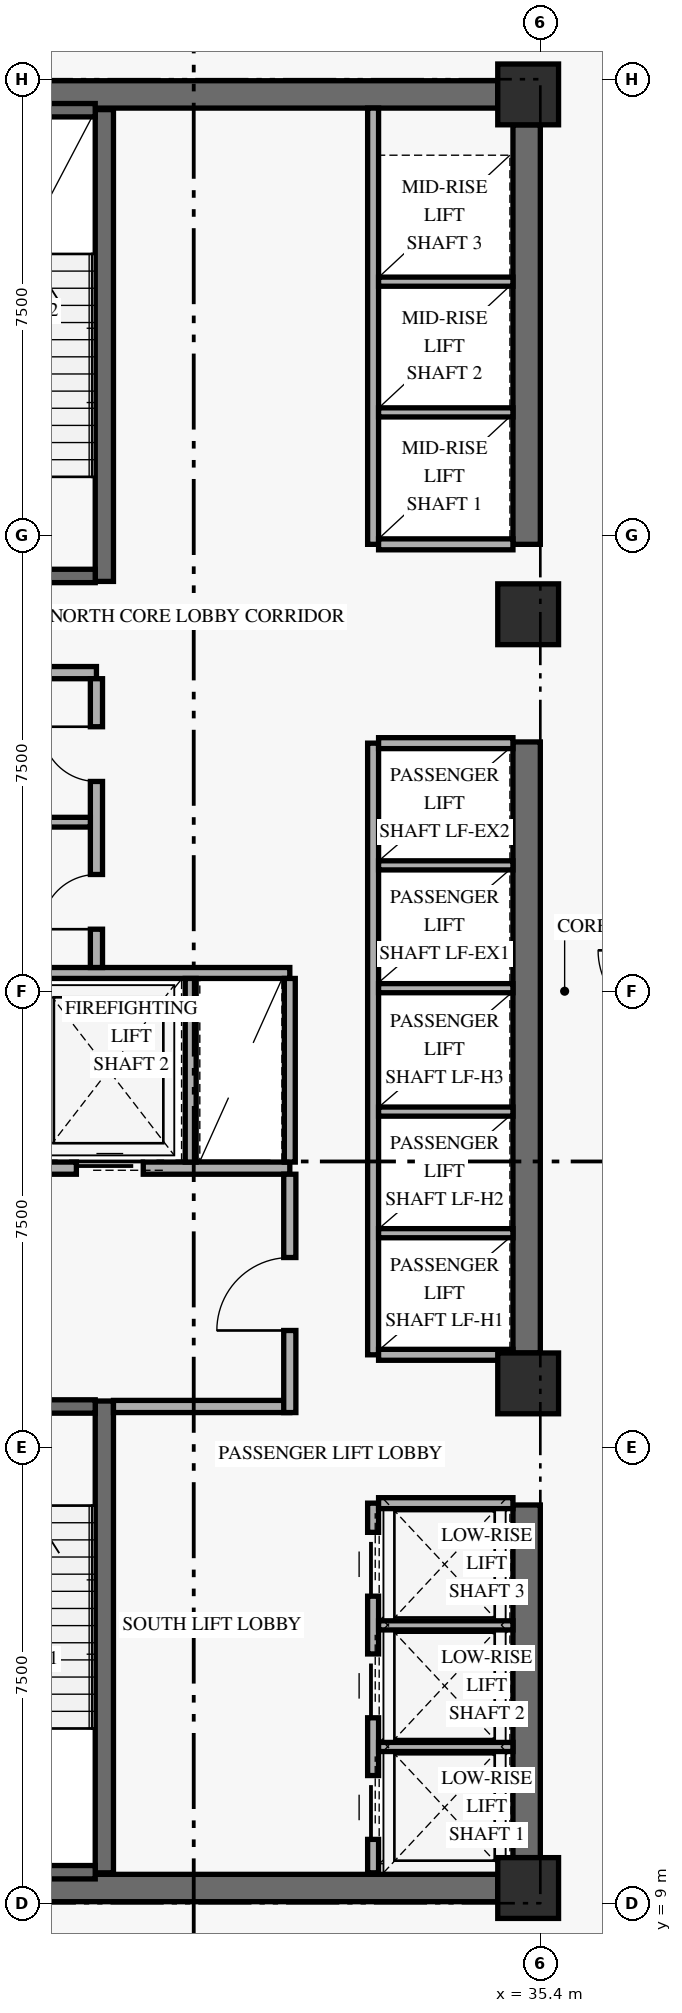
"""IFC4 building model, lengths in metres.
Left out: names, types, materials, properties, quantities, classifications, styles, units other than length and angle.
Written with IfcOpenShell. Run it as: python <this file> out.ifc"""

import sys

from ifc_helpers import new_model, si_unit, direction, frame, frame_2d, origin, origin_2d, place, context, subcontext, project, spatial, rectangle, extrude, element, fill, save


model = new_model("IFC4")
c1 = context("Model", 3, precision=1e-05, world=origin(), true_north=direction((0.0, 1.0)))
c2 = subcontext(c1, "Body", "Model", "MODEL_VIEW")
j1 = project(units=[si_unit("LENGTHUNIT", "METRE"), si_unit("PLANEANGLEUNIT", "RADIAN")], contexts=[c1])
p1 = place(None, origin())
s1 = spatial("IfcSite", under=j1, at=p1, CompositionType="ELEMENT")
p2 = place(p1, origin())
s2 = spatial("IfcBuilding", under=s1, at=p2, CompositionType="ELEMENT")
p3 = place(p2, frame((0.0, 0.0, 9.6)))
s3 = spatial("IfcBuildingStorey", under=s2, at=p3, CompositionType="ELEMENT", Elevation=9.6)
p4 = place(p3, frame((35.175, 9.75, 0.0), z_axis=(0.0, 0.0, 1.0), x_axis=(0.0, 1.0, 0.0)))
e1 = element("IfcWall", 1, at=p4, inside=s3, PredefinedType="SHEAR", context=c2, shape_type="SweptSolid", body=[
    extrude(rectangle(XDim=5.8, YDim=0.45, at=frame_2d((2.9, 0.0))), origin(), (0.0, 0.0, 1.0), 3.75),
])
p5 = place(p3, frame((35.175, 18.05, 0.0), z_axis=(0.0, 0.0, 1.0), x_axis=(0.0, 1.0, 0.0)))
e2 = element("IfcWall", 2, at=p5, inside=s3, PredefinedType="SHEAR", context=c2, shape_type="SweptSolid", body=[
    extrude(rectangle(XDim=10.05, YDim=0.45, at=frame_2d((5.025, 0.0))), origin(), (0.0, 0.0, 1.0), 3.75),
])
p6 = place(p3, frame((35.175, 31.35, 0.0), z_axis=(0.0, 0.0, 1.0), x_axis=(0.0, 1.0, 0.0)))
e3 = element("IfcWall", 3, at=p6, inside=s3, PredefinedType="SHEAR", context=c2, shape_type="SweptSolid", body=[
    extrude(rectangle(XDim=6.9, YDim=0.45, at=frame_2d((3.45, 0.0))), origin(), (0.0, 0.0, 1.0), 3.75),
])
for number, where, z_axis, x_axis in (
    (4, (24.7, 9.25, 0.0), (0.0, 0.0, 1.0), (1.0, 0.0, 0.0)),
    (5, (24.7, 38.75, 0.0), (0.0, 0.0, 1.0), (1.0, 0.0, 0.0)),
):
    element("IfcWall", number, at=place(p3, frame(where, z_axis=z_axis, x_axis=x_axis)), inside=s3, PredefinedType="SHEAR", context=c2, shape_type="SweptSolid", body=[
        extrude(rectangle(XDim=10.0, YDim=0.45, at=frame_2d((5.0, 0.0))), origin(), (0.0, 0.0, 1.0), 4.52),
    ])
p7 = place(p3, frame((28.23, 9.5, 0.0), z_axis=(0.0, 0.0, 1.0), x_axis=(0.0, 1.0, 0.0)))
e6 = element("IfcWall", 6, at=p7, inside=s3, PredefinedType="SHEAR", context=c2, shape_type="SweptSolid", body=[
    extrude(rectangle(XDim=7.76, YDim=0.3, at=frame_2d((3.88, 0.0))), origin(), (0.0, 0.0, 1.0), 4.52),
])
p8 = place(p3, frame((24.92, 9.51, 0.0), z_axis=(0.0, 0.0, 1.0), x_axis=(1.0, 0.0, 0.0)))
e7 = element("IfcWall", 7, at=p8, inside=s3, PredefinedType="SHEAR", context=c2, shape_type="SweptSolid", body=[
    extrude(rectangle(XDim=3.16, YDim=0.22, at=frame_2d((1.58, 0.0))), origin(), (0.0, 0.0, 1.0), 4.52),
])
p9 = place(p3, frame((24.92, 17.17, 0.0), z_axis=(0.0, 0.0, 1.0), x_axis=(1.0, 0.0, 0.0)))
e8 = element("IfcWall", 8, at=p9, inside=s3, PredefinedType="SHEAR", context=c2, shape_type="SweptSolid", body=[
    extrude(rectangle(XDim=3.16, YDim=0.22, at=frame_2d((1.58, 0.0))), origin(), (0.0, 0.0, 1.0), 4.52),
])
p10 = place(p9, frame((0.78, 0.0, 0.0)))
e9 = element("IfcOpeningElement", 9, at=p10, cuts=e8, PredefinedType="OPENING", context=c2, shape_type="SweptSolid", body=[
    extrude(rectangle(XDim=1.05, YDim=2.15, at=frame_2d((0.525, 1.075))), frame((0.0, 0.12, 0.0), z_axis=(0.0, -1.0, 0.0), x_axis=(1.0, 0.0, 0.0)), (0.0, 0.0, 1.0), 0.24),
])
p11 = place(p3, frame((28.23, 30.74, 0.0), z_axis=(0.0, 0.0, 1.0), x_axis=(0.0, 1.0, 0.0)))
e10 = element("IfcWall", 10, at=p11, inside=s3, PredefinedType="SHEAR", context=c2, shape_type="SweptSolid", body=[
    extrude(rectangle(XDim=7.76, YDim=0.3, at=frame_2d((3.88, 0.0))), origin(), (0.0, 0.0, 1.0), 4.52),
])
p12 = place(p3, frame((24.92, 30.83, 0.0), z_axis=(0.0, 0.0, 1.0), x_axis=(1.0, 0.0, 0.0)))
e11 = element("IfcWall", 11, at=p12, inside=s3, PredefinedType="SHEAR", context=c2, shape_type="SweptSolid", body=[
    extrude(rectangle(XDim=3.16, YDim=0.22, at=frame_2d((1.58, 0.0))), origin(), (0.0, 0.0, 1.0), 4.52),
])
p13 = place(p12, frame((0.78, 0.0, 0.0)))
e12 = element("IfcOpeningElement", 12, at=p13, cuts=e11, PredefinedType="OPENING", context=c2, shape_type="SweptSolid", body=[
    extrude(rectangle(XDim=1.05, YDim=2.15, at=frame_2d((0.525, 1.075))), frame((0.0, 0.12, 0.0), z_axis=(0.0, -1.0, 0.0), x_axis=(1.0, 0.0, 0.0)), (0.0, 0.0, 1.0), 0.24),
])
p14 = place(p3, frame((24.92, 38.49, 0.0), z_axis=(0.0, 0.0, 1.0), x_axis=(1.0, 0.0, 0.0)))
e13 = element("IfcWall", 13, at=p14, inside=s3, PredefinedType="SHEAR", context=c2, shape_type="SweptSolid", body=[
    extrude(rectangle(XDim=3.16, YDim=0.22, at=frame_2d((1.58, 0.0))), origin(), (0.0, 0.0, 1.0), 4.52),
])
for number, where, z_axis, x_axis in (
    (14, (35.2, 9.25, 0.0), (0.0, 0.0, 1.0), (1.0, 0.0, 0.0)),
    (15, (35.2, 17.55, 0.0), (0.0, 0.0, 1.0), (1.0, 0.0, 0.0)),
    (16, (35.2, 30.2, 0.0), (0.0, 0.0, 1.0), (1.0, 0.0, 0.0)),
    (17, (35.2, 38.75, 0.0), (0.0, 0.0, 1.0), (1.0, 0.0, 0.0)),
):
    element("IfcColumn", number, at=place(p3, frame(where, z_axis=z_axis, x_axis=x_axis)), inside=s3, PredefinedType="COLUMN", context=c2, shape_type="SweptSolid", body=[
        extrude(rectangle(XDim=1.0, YDim=1.0, at=origin_2d()), origin(), (0.0, 0.0, 1.0), 4.8),
    ])
p15 = place(p3, frame((24.45, 21.09, 0.0), z_axis=(0.0, 0.0, 1.0), x_axis=(1.0, 0.0, 0.0)))
e18 = element("IfcWall", 18, at=p15, inside=s3, PredefinedType="STANDARD", context=c2, shape_type="SweptSolid", body=[
    extrude(rectangle(XDim=6.83, YDim=0.2, at=frame_2d((3.415, 0.0))), origin(), (0.0, 0.0, 1.0), 4.52),
])
p16 = place(p15, frame((0.72, 0.0, 0.0)))
e19 = element("IfcOpeningElement", 19, at=p16, cuts=e18, PredefinedType="OPENING", context=c2, shape_type="SweptSolid", body=[
    extrude(rectangle(XDim=1.1, YDim=2.2, at=frame_2d((0.55, 1.1))), frame((0.0, 0.11, 0.0), z_axis=(0.0, -1.0, 0.0), x_axis=(1.0, 0.0, 0.0)), (0.0, 0.0, 1.0), 0.22),
])
p17 = place(p15, frame((3.32, 0.0, 0.0)))
e20 = element("IfcOpeningElement", 20, at=p17, cuts=e18, PredefinedType="OPENING", context=c2, shape_type="SweptSolid", body=[
    extrude(rectangle(XDim=1.1, YDim=2.2, at=frame_2d((0.55, 1.1))), frame((0.0, 0.11, 0.0), z_axis=(0.0, -1.0, 0.0), x_axis=(1.0, 0.0, 0.0)), (0.0, 0.0, 1.0), 0.22),
])
p18 = place(p3, frame((28.38, 17.17, 0.0), z_axis=(0.0, 0.0, 1.0), x_axis=(1.0, 0.0, 0.0)))
e21 = element("IfcWall", 21, at=p18, inside=s3, PredefinedType="STANDARD", context=c2, shape_type="SweptSolid", body=[
    extrude(rectangle(XDim=2.9, YDim=0.2, at=frame_2d((1.45, 0.0))), origin(), (0.0, 0.0, 1.0), 4.52),
])
p19 = place(p3, frame((31.28, 17.07, 0.0), z_axis=(0.0, 0.0, 1.0), x_axis=(0.0, 1.0, 0.0)))
e22 = element("IfcWall", 22, at=p19, inside=s3, PredefinedType="STANDARD", context=c2, shape_type="SweptSolid", body=[
    extrude(rectangle(XDim=3.92, YDim=0.2, at=frame_2d((1.96, 0.0))), origin(), (0.0, 0.0, 1.0), 3.575),
])
p20 = place(p19, frame((1.35, 0.0, 0.0)))
e23 = element("IfcOpeningElement", 23, at=p20, cuts=e22, PredefinedType="OPENING", context=c2, shape_type="SweptSolid", body=[
    extrude(rectangle(XDim=1.2, YDim=2.15, at=frame_2d((0.6, 1.075))), frame((0.0, 0.11, 0.0), z_axis=(0.0, -1.0, 0.0), x_axis=(1.0, 0.0, 0.0)), (0.0, 0.0, 1.0), 0.22),
])
p21 = place(p3, frame((24.45, 24.3, 0.0), z_axis=(0.0, 0.0, 1.0), x_axis=(1.0, 0.0, 0.0)))
e24 = element("IfcWall", 24, at=p21, inside=s3, PredefinedType="STANDARD", context=c2, shape_type="SweptSolid", body=[
    extrude(rectangle(XDim=6.83, YDim=0.18, at=frame_2d((3.415, 0.0))), origin(), (0.0, 0.0, 1.0), 4.52),
])
for number, where, z_axis, x_axis in (
    (25, (29.65, 21.19, 0.0), (0.0, 0.0, 1.0), (0.0, 1.0, 0.0)),
    (26, (31.28, 21.19, 0.0), (0.0, 0.0, 1.0), (0.0, 1.0, 0.0)),
):
    element("IfcWall", number, at=place(p3, frame(where, z_axis=z_axis, x_axis=x_axis)), inside=s3, PredefinedType="STANDARD", context=c2, shape_type="SweptSolid", body=[
        extrude(rectangle(XDim=3.02, YDim=0.18, at=frame_2d((1.51, 0.0))), origin(), (0.0, 0.0, 1.0), 4.52),
    ])
p22 = place(p3, frame((24.45, 29.24, 0.0), z_axis=(0.0, 0.0, 1.0), x_axis=(1.0, 0.0, 0.0)))
e27 = element("IfcWall", 27, at=p22, inside=s3, PredefinedType="STANDARD", context=c2, shape_type="SweptSolid", body=[
    extrude(rectangle(XDim=3.65, YDim=0.2, at=frame_2d((1.825, 0.0))), origin(), (0.0, 0.0, 1.0), 4.52),
])
p23 = place(p3, frame((28.1, 24.39, 0.0), z_axis=(0.0, 0.0, 1.0), x_axis=(0.0, 1.0, 0.0)))
e28 = element("IfcWall", 28, at=p23, inside=s3, PredefinedType="STANDARD", context=c2, shape_type="SweptSolid", body=[
    extrude(rectangle(XDim=4.75, YDim=0.2, at=frame_2d((2.375, 0.0))), origin(), (0.0, 0.0, 1.0), 4.52),
])
p24 = place(p23, frame((0.63, 0.0, 0.0)))
e29 = element("IfcOpeningElement", 29, at=p24, cuts=e28, PredefinedType="OPENING", context=c2, shape_type="SweptSolid", body=[
    extrude(rectangle(XDim=0.9, YDim=2.1, at=frame_2d((0.45, 1.05))), frame((0.0, 0.11, 0.0), z_axis=(0.0, -1.0, 0.0), x_axis=(1.0, 0.0, 0.0)), (0.0, 0.0, 1.0), 0.22),
])
p25 = place(p23, frame((3.06, 0.0, 0.0)))
e30 = element("IfcOpeningElement", 30, at=p25, cuts=e28, PredefinedType="OPENING", context=c2, shape_type="SweptSolid", body=[
    extrude(rectangle(XDim=0.9, YDim=2.1, at=frame_2d((0.45, 1.05))), frame((0.0, 0.11, 0.0), z_axis=(0.0, -1.0, 0.0), x_axis=(1.0, 0.0, 0.0)), (0.0, 0.0, 1.0), 0.22),
])
p26 = place(p3, frame((24.45, 26.78, 0.0), z_axis=(0.0, 0.0, 1.0), x_axis=(1.0, 0.0, 0.0)))
e31 = element("IfcWall", 31, at=p26, inside=s3, PredefinedType="PARTITIONING", context=c2, shape_type="SweptSolid", body=[
    extrude(rectangle(XDim=3.55, YDim=0.16, at=frame_2d((1.775, 0.0))), origin(), (0.0, 0.0, 1.0), 4.52),
])
p27 = place(p3, frame((32.65, 9.5, 0.0), z_axis=(0.0, 0.0, 1.0), x_axis=(0.0, 1.0, 0.0)))
e32 = element("IfcWall", 32, at=p27, inside=s3, PredefinedType="STANDARD", context=c2, shape_type="SweptSolid", body=[
    extrude(rectangle(XDim=6.08, YDim=0.18, at=frame_2d((3.04, 0.0))), origin(), (0.0, 0.0, 1.0), 4.52),
])
p28 = place(p27, frame((0.55, 0.0, 0.0)))
e33 = element("IfcOpeningElement", 33, at=p28, cuts=e32, PredefinedType="OPENING", context=c2, shape_type="SweptSolid", body=[
    extrude(rectangle(XDim=1.05, YDim=2.2, at=frame_2d((0.525, 1.1))), frame((0.0, 0.1, 0.0), z_axis=(0.0, -1.0, 0.0), x_axis=(1.0, 0.0, 0.0)), (0.0, 0.0, 1.0), 0.2),
])
p29 = place(p27, frame((2.55, 0.0, 0.0)))
e34 = element("IfcOpeningElement", 34, at=p29, cuts=e32, PredefinedType="OPENING", context=c2, shape_type="SweptSolid", body=[
    extrude(rectangle(XDim=1.05, YDim=2.2, at=frame_2d((0.525, 1.1))), frame((0.0, 0.1, 0.0), z_axis=(0.0, -1.0, 0.0), x_axis=(1.0, 0.0, 0.0)), (0.0, 0.0, 1.0), 0.2),
])
p30 = place(p27, frame((4.55, 0.0, 0.0)))
e35 = element("IfcOpeningElement", 35, at=p30, cuts=e32, PredefinedType="OPENING", context=c2, shape_type="SweptSolid", body=[
    extrude(rectangle(XDim=1.05, YDim=2.2, at=frame_2d((0.525, 1.1))), frame((0.0, 0.1, 0.0), z_axis=(0.0, -1.0, 0.0), x_axis=(1.0, 0.0, 0.0)), (0.0, 0.0, 1.0), 0.2),
])
p31 = place(p3, frame((32.74, 15.58, 0.0), z_axis=(0.0, 0.0, 1.0), x_axis=(1.0, 0.0, 0.0)))
e36 = element("IfcWall", 36, at=p31, inside=s3, PredefinedType="STANDARD", context=c2, shape_type="SweptSolid", body=[
    extrude(rectangle(XDim=2.21, YDim=0.18, at=frame_2d((1.105, 0.0))), origin(), (0.0, 0.0, 1.0), 4.52),
])
for number, where, z_axis, x_axis in (
    (37, (32.74, 11.57, 0.0), (0.0, 0.0, 1.0), (1.0, 0.0, 0.0)),
    (38, (32.74, 13.57, 0.0), (0.0, 0.0, 1.0), (1.0, 0.0, 0.0)),
):
    element("IfcWall", number, at=place(p3, frame(where, z_axis=z_axis, x_axis=x_axis)), inside=s3, PredefinedType="STANDARD", context=c2, shape_type="SweptSolid", body=[
        extrude(rectangle(XDim=2.21, YDim=0.15, at=frame_2d((1.105, 0.0))), origin(), (0.0, 0.0, 1.0), 4.52),
    ])
p32 = place(p3, frame((32.65, 18.02, 0.0), z_axis=(0.0, 0.0, 1.0), x_axis=(0.0, 1.0, 0.0)))
e39 = element("IfcWall", 39, at=p32, inside=s3, PredefinedType="STANDARD", context=c2, shape_type="SweptSolid", body=[
    extrude(rectangle(XDim=10.06, YDim=0.18, at=frame_2d((5.03, 0.0))), origin(), (0.0, 0.0, 1.0), 4.52),
])
for number, where, z_axis, x_axis in (
    (40, (32.74, 18.02, 0.0), (0.0, 0.0, 1.0), (1.0, 0.0, 0.0)),
    (41, (32.74, 28.08, 0.0), (0.0, 0.0, 1.0), (1.0, 0.0, 0.0)),
):
    element("IfcWall", number, at=place(p3, frame(where, z_axis=z_axis, x_axis=x_axis)), inside=s3, PredefinedType="STANDARD", context=c2, shape_type="SweptSolid", body=[
        extrude(rectangle(XDim=2.21, YDim=0.18, at=frame_2d((1.105, 0.0))), origin(), (0.0, 0.0, 1.0), 4.52),
    ])
for number, where, z_axis, x_axis in (
    (42, (32.74, 20.02, 0.0), (0.0, 0.0, 1.0), (1.0, 0.0, 0.0)),
    (43, (32.74, 22.02, 0.0), (0.0, 0.0, 1.0), (1.0, 0.0, 0.0)),
    (44, (32.74, 24.05, 0.0), (0.0, 0.0, 1.0), (1.0, 0.0, 0.0)),
    (45, (32.74, 26.07, 0.0), (0.0, 0.0, 1.0), (1.0, 0.0, 0.0)),
):
    element("IfcWall", number, at=place(p3, frame(where, z_axis=z_axis, x_axis=x_axis)), inside=s3, PredefinedType="STANDARD", context=c2, shape_type="SweptSolid", body=[
        extrude(rectangle(XDim=2.21, YDim=0.15, at=frame_2d((1.105, 0.0))), origin(), (0.0, 0.0, 1.0), 4.52),
    ])
p33 = place(p3, frame((32.65, 31.35, 0.0), z_axis=(0.0, 0.0, 1.0), x_axis=(0.0, 1.0, 0.0)))
e46 = element("IfcWall", 46, at=p33, inside=s3, PredefinedType="STANDARD", context=c2, shape_type="SweptSolid", body=[
    extrude(rectangle(XDim=7.175, YDim=0.18, at=frame_2d((3.587, 0.0))), origin(), (0.0, 0.0, 1.0), 4.52),
])
p34 = place(p3, frame((32.74, 31.35, 0.0), z_axis=(0.0, 0.0, 1.0), x_axis=(1.0, 0.0, 0.0)))
e47 = element("IfcWall", 47, at=p34, inside=s3, PredefinedType="STANDARD", context=c2, shape_type="SweptSolid", body=[
    extrude(rectangle(XDim=2.21, YDim=0.18, at=frame_2d((1.105, 0.0))), origin(), (0.0, 0.0, 1.0), 4.52),
])
for number, where, z_axis, x_axis in (
    (48, (32.74, 33.52, 0.0), (0.0, 0.0, 1.0), (1.0, 0.0, 0.0)),
    (49, (32.74, 35.67, 0.0), (0.0, 0.0, 1.0), (1.0, 0.0, 0.0)),
):
    element("IfcWall", number, at=place(p3, frame(where, z_axis=z_axis, x_axis=x_axis)), inside=s3, PredefinedType="STANDARD", context=c2, shape_type="SweptSolid", body=[
        extrude(rectangle(XDim=2.21, YDim=0.15, at=frame_2d((1.105, 0.0))), origin(), (0.0, 0.0, 1.0), 4.52),
    ])
p35 = place(p17, origin())
e50 = element("IfcDoor", 50, at=p35, inside=s3, OperationType="SLIDING_TO_LEFT", PredefinedType="DOOR", context=c2, shape_type="SweptSolid", body=[
    extrude(rectangle(XDim=1.1, YDim=2.2, at=frame_2d((0.55, 1.1))), frame((0.0, 0.025, 0.0), z_axis=(0.0, -1.0, 0.0), x_axis=(1.0, 0.0, 0.0)), (0.0, 0.0, 1.0), 0.05),
])
fill(e20, e50)
p36 = place(p20, origin())
e51 = element("IfcDoor", 51, at=p36, inside=s3, OperationType="SINGLE_SWING_LEFT", PredefinedType="DOOR", context=c2, shape_type="SweptSolid", body=[
    extrude(rectangle(XDim=1.2, YDim=2.15, at=frame_2d((0.6, 1.075))), frame((0.0, 0.025, 0.0), z_axis=(0.0, -1.0, 0.0), x_axis=(1.0, 0.0, 0.0)), (0.0, 0.0, 1.0), 0.05),
])
fill(e23, e51)
p37 = place(p24, origin())
e52 = element("IfcDoor", 52, at=p37, inside=s3, OperationType="SINGLE_SWING_LEFT", PredefinedType="DOOR", context=c2, shape_type="SweptSolid", body=[
    extrude(rectangle(XDim=0.9, YDim=2.1, at=frame_2d((0.45, 1.05))), frame((0.0, 0.025, 0.0), z_axis=(0.0, -1.0, 0.0), x_axis=(1.0, 0.0, 0.0)), (0.0, 0.0, 1.0), 0.05),
])
fill(e29, e52)
p38 = place(p25, origin())
e53 = element("IfcDoor", 53, at=p38, inside=s3, OperationType="SINGLE_SWING_RIGHT", PredefinedType="DOOR", context=c2, shape_type="SweptSolid", body=[
    extrude(rectangle(XDim=0.9, YDim=2.1, at=frame_2d((0.45, 1.05))), frame((0.0, 0.025, 0.0), z_axis=(0.0, -1.0, 0.0), x_axis=(1.0, 0.0, 0.0)), (0.0, 0.0, 1.0), 0.05),
])
fill(e30, e53)
p39 = place(p28, origin())
e54 = element("IfcDoor", 54, at=p39, inside=s3, OperationType="SLIDING_TO_LEFT", PredefinedType="DOOR", context=c2, shape_type="SweptSolid", body=[
    extrude(rectangle(XDim=1.05, YDim=2.2, at=frame_2d((0.525, 1.1))), frame((0.0, 0.025, 0.0), z_axis=(0.0, -1.0, 0.0), x_axis=(1.0, 0.0, 0.0)), (0.0, 0.0, 1.0), 0.05),
])
fill(e33, e54)
p40 = place(p29, origin())
e55 = element("IfcDoor", 55, at=p40, inside=s3, OperationType="SLIDING_TO_LEFT", PredefinedType="DOOR", context=c2, shape_type="SweptSolid", body=[
    extrude(rectangle(XDim=1.05, YDim=2.2, at=frame_2d((0.525, 1.1))), frame((0.0, 0.025, 0.0), z_axis=(0.0, -1.0, 0.0), x_axis=(1.0, 0.0, 0.0)), (0.0, 0.0, 1.0), 0.05),
])
fill(e34, e55)
p41 = place(p30, origin())
e56 = element("IfcDoor", 56, at=p41, inside=s3, OperationType="SLIDING_TO_LEFT", PredefinedType="DOOR", context=c2, shape_type="SweptSolid", body=[
    extrude(rectangle(XDim=1.05, YDim=2.2, at=frame_2d((0.525, 1.1))), frame((0.0, 0.025, 0.0), z_axis=(0.0, -1.0, 0.0), x_axis=(1.0, 0.0, 0.0)), (0.0, 0.0, 1.0), 0.05),
])
fill(e35, e56)
save(model, sys.argv[1])
